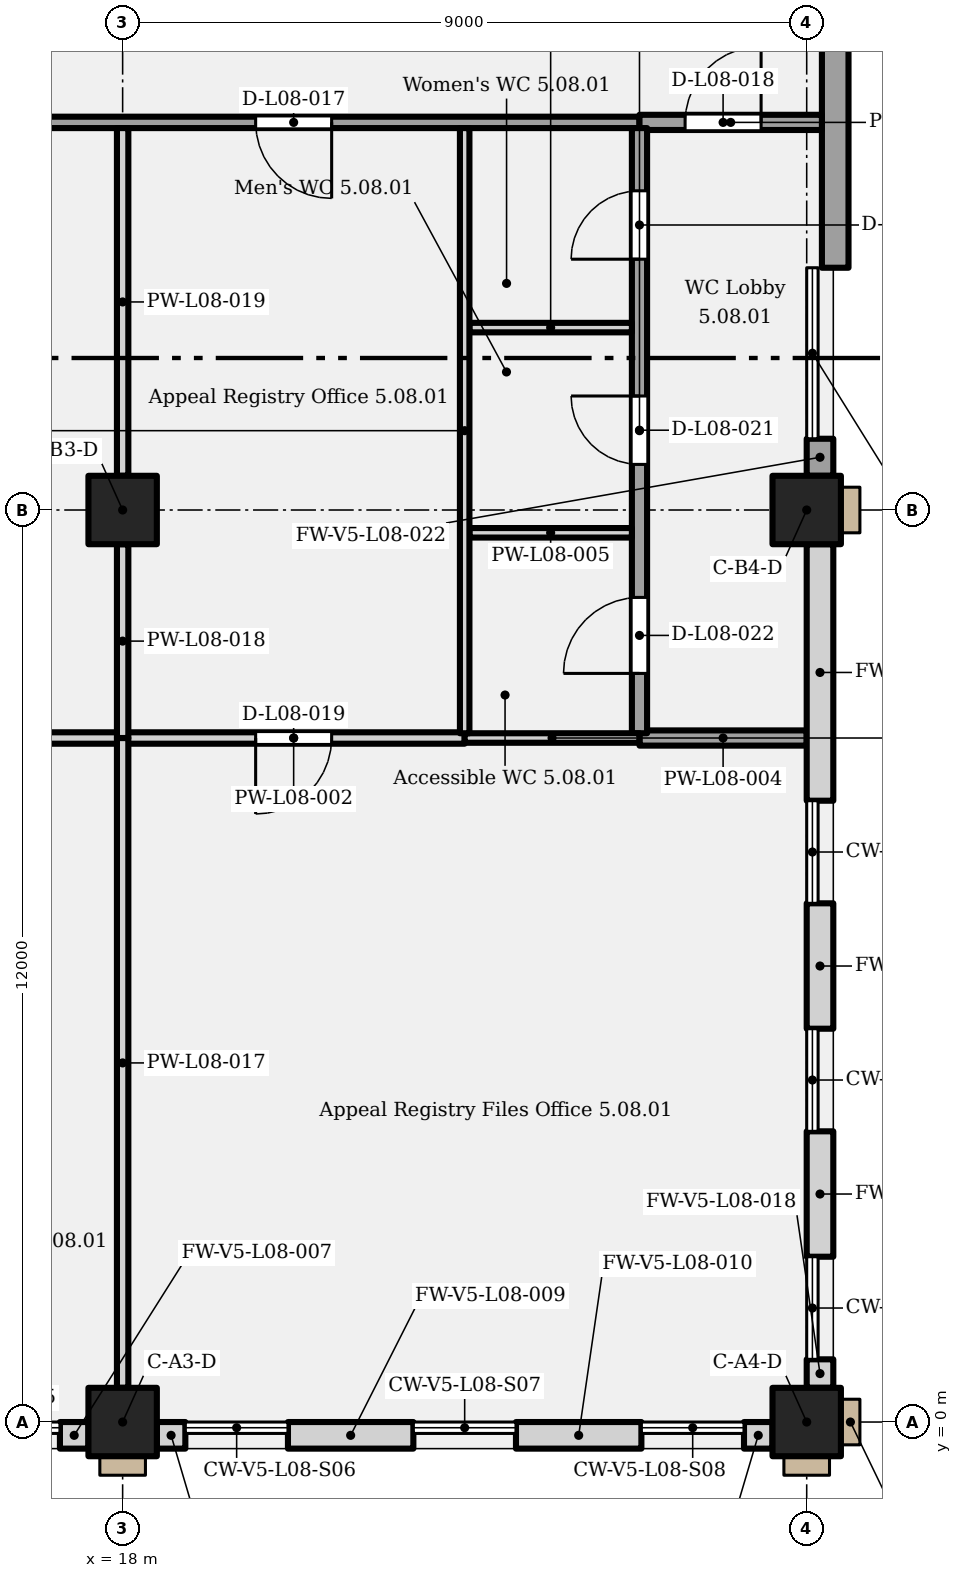
"""IFC4 building model, lengths in metres.
Left out: names, types, materials, properties, quantities, classifications, styles, units other than length and angle.
Written with IfcOpenShell. Run it as: python <this file> out.ifc"""

import sys

from ifc_helpers import new_model, si_unit, direction, frame, frame_2d, origin, origin_2d, place, context, subcontext, project, spatial, rectangle, extrude, element, fill, save


model = new_model("IFC4")
c1 = context("Model", 3, precision=1e-05, world=origin(), true_north=direction((0.0, 1.0)))
c2 = subcontext(c1, "Body", "Model", "MODEL_VIEW")
j1 = project(units=[si_unit("LENGTHUNIT", "METRE"), si_unit("PLANEANGLEUNIT", "RADIAN")], contexts=[c1])
p1 = place(None, origin())
s1 = spatial("IfcSite", under=j1, at=p1, CompositionType="ELEMENT")
p2 = place(p1, origin())
s2 = spatial("IfcBuilding", under=s1, at=p2, CompositionType="ELEMENT")
p3 = place(p2, frame((0.0, 0.0, 44.4)))
s3 = spatial("IfcBuildingStorey", under=s2, at=p3, CompositionType="ELEMENT", Elevation=44.4)
for number, where, z_axis, x_axis in (
    (1, (18.0, 0.0, 0.0), (0.0, 0.0, 1.0), (1.0, 0.0, 0.0)),
    (2, (27.0, 0.0, 0.0), (0.0, 0.0, 1.0), (1.0, 0.0, 0.0)),
    (3, (18.0, 12.0, 0.0), (0.0, 0.0, 1.0), (1.0, 0.0, 0.0)),
    (4, (27.0, 12.0, 0.0), (0.0, 0.0, 1.0), (1.0, 0.0, 0.0)),
):
    element("IfcColumn", number, at=place(p3, frame(where, z_axis=z_axis, x_axis=x_axis)), inside=s3, PredefinedType="COLUMN", context=c2, shape_type="SweptSolid", body=[
        extrude(rectangle(XDim=0.9, YDim=0.9, at=origin_2d()), origin(), (0.0, 0.0, 1.0), 4.5),
    ])
for number, where, z_axis, x_axis in (
    (5, (17.175, -0.175, 0.0), (0.0, 0.0, 1.0), (1.0, 0.0, 0.0)),
    (6, (18.45, -0.175, 0.0), (0.0, 0.0, 1.0), (1.0, 0.0, 0.0)),
):
    element("IfcWall", number, at=place(p3, frame(where, z_axis=z_axis, x_axis=x_axis)), inside=s3, PredefinedType="SOLIDWALL", context=c2, shape_type="SweptSolid", body=[
        extrude(rectangle(XDim=0.375, YDim=0.35, at=frame_2d((0.188, 0.0))), origin(), (0.0, 0.0, 1.0), 4.25),
    ])
for number, where, z_axis, x_axis in (
    (7, (20.175, -0.175, 0.0), (0.0, 0.0, 1.0), (1.0, 0.0, 0.0)),
    (8, (23.175, -0.175, 0.0), (0.0, 0.0, 1.0), (1.0, 0.0, 0.0)),
):
    element("IfcWall", number, at=place(p3, frame(where, z_axis=z_axis, x_axis=x_axis)), inside=s3, PredefinedType="SOLIDWALL", context=c2, shape_type="SweptSolid", body=[
        extrude(rectangle(XDim=1.65, YDim=0.35, at=frame_2d((0.825, 0.0))), origin(), (0.0, 0.0, 1.0), 4.25),
    ])
for number, where, z_axis, x_axis in (
    (9, (26.175, -0.175, 0.0), (0.0, 0.0, 1.0), (1.0, 0.0, 0.0)),
    (10, (27.175, 0.45, 0.0), (0.0, 0.0, 1.0), (0.0, 1.0, 0.0)),
):
    element("IfcWall", number, at=place(p3, frame(where, z_axis=z_axis, x_axis=x_axis)), inside=s3, PredefinedType="SOLIDWALL", context=c2, shape_type="SweptSolid", body=[
        extrude(rectangle(XDim=0.375, YDim=0.35, at=frame_2d((0.188, 0.0))), origin(), (0.0, 0.0, 1.0), 4.25),
    ])
for number, where, z_axis, x_axis in (
    (11, (27.175, 2.175, 0.0), (0.0, 0.0, 1.0), (0.0, 1.0, 0.0)),
    (12, (27.175, 5.175, 0.0), (0.0, 0.0, 1.0), (0.0, 1.0, 0.0)),
):
    element("IfcWall", number, at=place(p3, frame(where, z_axis=z_axis, x_axis=x_axis)), inside=s3, PredefinedType="SOLIDWALL", context=c2, shape_type="SweptSolid", body=[
        extrude(rectangle(XDim=1.65, YDim=0.35, at=frame_2d((0.825, 0.0))), origin(), (0.0, 0.0, 1.0), 4.25),
    ])
p4 = place(p3, frame((27.175, 8.175, 0.0), z_axis=(0.0, 0.0, 1.0), x_axis=(0.0, 1.0, 0.0)))
e13 = element("IfcWall", 13, at=p4, inside=s3, PredefinedType="SOLIDWALL", context=c2, shape_type="SweptSolid", body=[
    extrude(rectangle(XDim=3.375, YDim=0.35, at=frame_2d((1.688, 0.0))), origin(), (0.0, 0.0, 1.0), 4.25),
])
p5 = place(p3, frame((27.175, 12.45, 0.0), z_axis=(0.0, 0.0, 1.0), x_axis=(0.0, 1.0, 0.0)))
e14 = element("IfcWall", 14, at=p5, inside=s3, PredefinedType="SOLIDWALL", context=c2, shape_type="SweptSolid", body=[
    extrude(rectangle(XDim=0.488, YDim=0.35, at=frame_2d((0.244, 0.0))), origin(), (0.0, 0.0, 1.0), 4.25),
])
p6 = place(p3, frame((27.375, 15.188, 0.0), z_axis=(0.0, 0.0, 1.0), x_axis=(0.0, 1.0, 0.0)))
e15 = element("IfcWall", 15, at=p6, inside=s3, PredefinedType="SOLIDWALL", context=c2, shape_type="SweptSolid", body=[
    extrude(rectangle(XDim=12.863, YDim=0.35, at=frame_2d((6.431, 0.0))), origin(), (0.0, 0.0, 1.0), 4.25),
])
p7 = place(p3, frame((9.087, 9.0, 0.0), z_axis=(0.0, 0.0, 1.0), x_axis=(1.0, 0.0, 0.0)))
e16 = element("IfcWall", 16, at=p7, inside=s3, PredefinedType="PARTITIONING", context=c2, shape_type="SweptSolid", body=[
    extrude(rectangle(XDim=8.913, YDim=0.15, at=frame_2d((4.456, 0.0))), origin(), (0.0, 0.0, 1.0), 4.25),
])
p8 = place(p7, frame((4.913, 0.0, 0.0), z_axis=(0.0, 0.0, 1.0), x_axis=(-1.0, 0.0, 0.0)))
e17 = element("IfcOpeningElement", 17, at=p8, cuts=e16, PredefinedType="OPENING", context=c2, shape_type="SweptSolid", body=[
    extrude(rectangle(XDim=1.0, YDim=2.1, at=frame_2d((0.5, 1.05))), frame((0.0, 0.085, 0.0), z_axis=(0.0, -1.0, 0.0), x_axis=(1.0, 0.0, 0.0)), (0.0, 0.0, 1.0), 0.17),
])
p9 = place(p3, frame((18.0, 9.0, 0.0), z_axis=(0.0, 0.0, 1.0), x_axis=(1.0, 0.0, 0.0)))
e18 = element("IfcWall", 18, at=p9, inside=s3, PredefinedType="PARTITIONING", context=c2, shape_type="SweptSolid", body=[
    extrude(rectangle(XDim=4.5, YDim=0.15, at=frame_2d((2.25, 0.0))), origin(), (0.0, 0.0, 1.0), 4.25),
])
p10 = place(p9, frame((2.75, 0.0, 0.0), z_axis=(0.0, 0.0, 1.0), x_axis=(-1.0, 0.0, 0.0)))
e19 = element("IfcOpeningElement", 19, at=p10, cuts=e18, PredefinedType="OPENING", context=c2, shape_type="SweptSolid", body=[
    extrude(rectangle(XDim=1.0, YDim=2.1, at=frame_2d((0.5, 1.05))), frame((0.0, 0.085, 0.0), z_axis=(0.0, -1.0, 0.0), x_axis=(1.0, 0.0, 0.0)), (0.0, 0.0, 1.0), 0.17),
])
p11 = place(p3, frame((22.5, 9.0, 0.0), z_axis=(0.0, 0.0, 1.0), x_axis=(1.0, 0.0, 0.0)))
e20 = element("IfcWall", 20, at=p11, inside=s3, PredefinedType="PARTITIONING", context=c2, shape_type="SweptSolid", body=[
    extrude(rectangle(XDim=2.3, YDim=0.125, at=frame_2d((1.15, 0.0))), origin(), (0.0, 0.0, 1.0), 4.25),
])
p12 = place(p3, frame((24.8, 9.0, 0.0), z_axis=(0.0, 0.0, 1.0), x_axis=(1.0, 0.0, 0.0)))
e21 = element("IfcWall", 21, at=p12, inside=s3, PredefinedType="PARTITIONING", context=c2, shape_type="SweptSolid", body=[
    extrude(rectangle(XDim=2.2, YDim=0.2, at=frame_2d((1.1, 0.0))), origin(), (0.0, 0.0, 1.0), 4.25),
])
p13 = place(p3, frame((22.562, 11.7, 0.0), z_axis=(0.0, 0.0, 1.0), x_axis=(1.0, 0.0, 0.0)))
e22 = element("IfcWall", 22, at=p13, inside=s3, PredefinedType="PARTITIONING", context=c2, shape_type="SweptSolid", body=[
    extrude(rectangle(XDim=2.137, YDim=0.125, at=frame_2d((1.069, 0.0))), origin(), (0.0, 0.0, 1.0), 3.5),
])
p14 = place(p3, frame((22.562, 14.4, 0.0), z_axis=(0.0, 0.0, 1.0), x_axis=(1.0, 0.0, 0.0)))
e23 = element("IfcWall", 23, at=p14, inside=s3, PredefinedType="PARTITIONING", context=c2, shape_type="SweptSolid", body=[
    extrude(rectangle(XDim=2.137, YDim=0.125, at=frame_2d((1.069, 0.0))), origin(), (0.0, 0.0, 1.0), 4.25),
])
p15 = place(p3, frame((-0.2, 17.1, 0.0), z_axis=(0.0, 0.0, 1.0), x_axis=(1.0, 0.0, 0.0)))
e24 = element("IfcWall", 24, at=p15, inside=s3, PredefinedType="PARTITIONING", context=c2, shape_type="SweptSolid", body=[
    extrude(rectangle(XDim=25.0, YDim=0.15, at=frame_2d((12.5, 0.0))), origin(), (0.0, 0.0, 1.0), 4.25),
])
p16 = place(p15, frame((2.95, 0.0, 0.0), z_axis=(0.0, 0.0, 1.0), x_axis=(-1.0, 0.0, 0.0)))
e25 = element("IfcOpeningElement", 25, at=p16, cuts=e24, PredefinedType="OPENING", context=c2, shape_type="SweptSolid", body=[
    extrude(rectangle(XDim=1.0, YDim=2.1, at=frame_2d((0.5, 1.05))), frame((0.0, 0.085, 0.0), z_axis=(0.0, -1.0, 0.0), x_axis=(1.0, 0.0, 0.0)), (0.0, 0.0, 1.0), 0.17),
])
p17 = place(p15, frame((7.45, 0.0, 0.0), z_axis=(0.0, 0.0, 1.0), x_axis=(-1.0, 0.0, 0.0)))
e26 = element("IfcOpeningElement", 26, at=p17, cuts=e24, PredefinedType="OPENING", context=c2, shape_type="SweptSolid", body=[
    extrude(rectangle(XDim=1.0, YDim=2.1, at=frame_2d((0.5, 1.05))), frame((0.0, 0.085, 0.0), z_axis=(0.0, -1.0, 0.0), x_axis=(1.0, 0.0, 0.0)), (0.0, 0.0, 1.0), 0.17),
])
p18 = place(p15, frame((14.2, 0.0, 0.0), z_axis=(0.0, 0.0, 1.0), x_axis=(-1.0, 0.0, 0.0)))
e27 = element("IfcOpeningElement", 27, at=p18, cuts=e24, PredefinedType="OPENING", context=c2, shape_type="SweptSolid", body=[
    extrude(rectangle(XDim=1.0, YDim=2.1, at=frame_2d((0.5, 1.05))), frame((0.0, 0.085, 0.0), z_axis=(0.0, -1.0, 0.0), x_axis=(1.0, 0.0, 0.0)), (0.0, 0.0, 1.0), 0.17),
])
p19 = place(p15, frame((20.95, 0.0, 0.0), z_axis=(0.0, 0.0, 1.0), x_axis=(-1.0, 0.0, 0.0)))
e28 = element("IfcOpeningElement", 28, at=p19, cuts=e24, PredefinedType="OPENING", context=c2, shape_type="SweptSolid", body=[
    extrude(rectangle(XDim=1.0, YDim=2.1, at=frame_2d((0.5, 1.05))), frame((0.0, 0.085, 0.0), z_axis=(0.0, -1.0, 0.0), x_axis=(1.0, 0.0, 0.0)), (0.0, 0.0, 1.0), 0.17),
])
p20 = place(p3, frame((24.8, 17.1, 0.0), z_axis=(0.0, 0.0, 1.0), x_axis=(1.0, 0.0, 0.0)))
e29 = element("IfcWall", 29, at=p20, inside=s3, PredefinedType="PARTITIONING", context=c2, shape_type="SweptSolid", body=[
    extrude(rectangle(XDim=2.4, YDim=0.2, at=frame_2d((1.2, 0.0))), origin(), (0.0, 0.0, 1.0), 4.25),
])
p21 = place(p20, frame((0.6, 0.0, 0.0)))
e30 = element("IfcOpeningElement", 30, at=p21, cuts=e29, PredefinedType="OPENING", context=c2, shape_type="SweptSolid", body=[
    extrude(rectangle(XDim=1.0, YDim=2.1, at=frame_2d((0.5, 1.05))), frame((0.0, 0.11, 0.0), z_axis=(0.0, -1.0, 0.0), x_axis=(1.0, 0.0, 0.0)), (0.0, 0.0, 1.0), 0.22),
])
p22 = place(p3, frame((18.0, 0.45, 0.0), z_axis=(0.0, 0.0, 1.0), x_axis=(0.0, 1.0, 0.0)))
e31 = element("IfcWall", 31, at=p22, inside=s3, PredefinedType="PARTITIONING", context=c2, shape_type="SweptSolid", body=[
    extrude(rectangle(XDim=8.55, YDim=0.15, at=frame_2d((4.275, 0.0))), origin(), (0.0, 0.0, 1.0), 3.5),
])
p23 = place(p3, frame((18.0, 9.0, 0.0), z_axis=(0.0, 0.0, 1.0), x_axis=(0.0, 1.0, 0.0)))
e32 = element("IfcWall", 32, at=p23, inside=s3, PredefinedType="PARTITIONING", context=c2, shape_type="SweptSolid", body=[
    extrude(rectangle(XDim=2.55, YDim=0.15, at=frame_2d((1.275, 0.0))), origin(), (0.0, 0.0, 1.0), 3.5),
])
p24 = place(p3, frame((18.0, 12.45, 0.0), z_axis=(0.0, 0.0, 1.0), x_axis=(0.0, 1.0, 0.0)))
e33 = element("IfcWall", 33, at=p24, inside=s3, PredefinedType="PARTITIONING", context=c2, shape_type="SweptSolid", body=[
    extrude(rectangle(XDim=4.575, YDim=0.15, at=frame_2d((2.288, 0.0))), origin(), (0.0, 0.0, 1.0), 3.3),
])
p25 = place(p3, frame((22.5, 9.062, 0.0), z_axis=(0.0, 0.0, 1.0), x_axis=(0.0, 1.0, 0.0)))
e34 = element("IfcWall", 34, at=p25, inside=s3, PredefinedType="PARTITIONING", context=c2, shape_type="SweptSolid", body=[
    extrude(rectangle(XDim=7.962, YDim=0.125, at=frame_2d((3.981, 0.0))), origin(), (0.0, 0.0, 1.0), 4.25),
])
p26 = place(p3, frame((24.8, 9.062, 0.0), z_axis=(0.0, 0.0, 1.0), x_axis=(0.0, 1.0, 0.0)))
e35 = element("IfcWall", 35, at=p26, inside=s3, PredefinedType="PARTITIONING", context=c2, shape_type="SweptSolid", body=[
    extrude(rectangle(XDim=7.962, YDim=0.2, at=frame_2d((3.981, 0.0))), origin(), (0.0, 0.0, 1.0), 4.25),
])
p27 = place(p26, frame((6.238, 0.0, 0.0)))
e36 = element("IfcOpeningElement", 36, at=p27, cuts=e35, PredefinedType="OPENING", context=c2, shape_type="SweptSolid", body=[
    extrude(rectangle(XDim=0.9, YDim=2.1, at=frame_2d((0.45, 1.05))), frame((0.0, 0.11, 0.0), z_axis=(0.0, -1.0, 0.0), x_axis=(1.0, 0.0, 0.0)), (0.0, 0.0, 1.0), 0.22),
])
p28 = place(p26, frame((3.538, 0.0, 0.0)))
e37 = element("IfcOpeningElement", 37, at=p28, cuts=e35, PredefinedType="OPENING", context=c2, shape_type="SweptSolid", body=[
    extrude(rectangle(XDim=0.9, YDim=2.1, at=frame_2d((0.45, 1.05))), frame((0.0, 0.11, 0.0), z_axis=(0.0, -1.0, 0.0), x_axis=(1.0, 0.0, 0.0)), (0.0, 0.0, 1.0), 0.22),
])
p29 = place(p26, frame((0.788, 0.0, 0.0)))
e38 = element("IfcOpeningElement", 38, at=p29, cuts=e35, PredefinedType="OPENING", context=c2, shape_type="SweptSolid", body=[
    extrude(rectangle(XDim=1.0, YDim=2.1, at=frame_2d((0.5, 1.05))), frame((0.0, 0.11, 0.0), z_axis=(0.0, -1.0, 0.0), x_axis=(1.0, 0.0, 0.0)), (0.0, 0.0, 1.0), 0.22),
])
p30 = place(p19, origin())
e39 = element("IfcDoor", 39, at=p30, inside=s3, OperationType="SINGLE_SWING_LEFT", PredefinedType="DOOR", context=c2, shape_type="SweptSolid", body=[
    extrude(rectangle(XDim=1.0, YDim=2.1, at=frame_2d((0.5, 1.05))), frame((0.0, 0.025, 0.0), z_axis=(0.0, -1.0, 0.0), x_axis=(1.0, 0.0, 0.0)), (0.0, 0.0, 1.0), 0.05),
])
fill(e28, e39)
p31 = place(p21, origin())
e40 = element("IfcDoor", 40, at=p31, inside=s3, OperationType="SINGLE_SWING_RIGHT", PredefinedType="DOOR", context=c2, shape_type="SweptSolid", body=[
    extrude(rectangle(XDim=1.0, YDim=2.1, at=frame_2d((0.5, 1.05))), frame((0.0, 0.025, 0.0), z_axis=(0.0, -1.0, 0.0), x_axis=(1.0, 0.0, 0.0)), (0.0, 0.0, 1.0), 0.05),
])
fill(e30, e40)
p32 = place(p10, origin())
e41 = element("IfcDoor", 41, at=p32, inside=s3, OperationType="SINGLE_SWING_RIGHT", PredefinedType="DOOR", context=c2, shape_type="SweptSolid", body=[
    extrude(rectangle(XDim=1.0, YDim=2.1, at=frame_2d((0.5, 1.05))), frame((0.0, 0.025, 0.0), z_axis=(0.0, -1.0, 0.0), x_axis=(1.0, 0.0, 0.0)), (0.0, 0.0, 1.0), 0.05),
])
fill(e19, e41)
p33 = place(p27, origin())
e42 = element("IfcDoor", 42, at=p33, inside=s3, OperationType="SINGLE_SWING_LEFT", PredefinedType="DOOR", context=c2, shape_type="SweptSolid", body=[
    extrude(rectangle(XDim=0.9, YDim=2.1, at=frame_2d((0.45, 1.05))), frame((0.0, 0.025, 0.0), z_axis=(0.0, -1.0, 0.0), x_axis=(1.0, 0.0, 0.0)), (0.0, 0.0, 1.0), 0.05),
])
fill(e36, e42)
p34 = place(p28, origin())
e43 = element("IfcDoor", 43, at=p34, inside=s3, OperationType="SINGLE_SWING_RIGHT", PredefinedType="DOOR", context=c2, shape_type="SweptSolid", body=[
    extrude(rectangle(XDim=0.9, YDim=2.1, at=frame_2d((0.45, 1.05))), frame((0.0, 0.025, 0.0), z_axis=(0.0, -1.0, 0.0), x_axis=(1.0, 0.0, 0.0)), (0.0, 0.0, 1.0), 0.05),
])
fill(e37, e43)
p35 = place(p29, origin())
e44 = element("IfcDoor", 44, at=p35, inside=s3, OperationType="SINGLE_SWING_LEFT", PredefinedType="DOOR", context=c2, shape_type="SweptSolid", body=[
    extrude(rectangle(XDim=1.0, YDim=2.1, at=frame_2d((0.5, 1.05))), frame((0.0, 0.025, 0.0), z_axis=(0.0, -1.0, 0.0), x_axis=(1.0, 0.0, 0.0)), (0.0, 0.0, 1.0), 0.05),
])
fill(e38, e44)
save(model, sys.argv[1])
